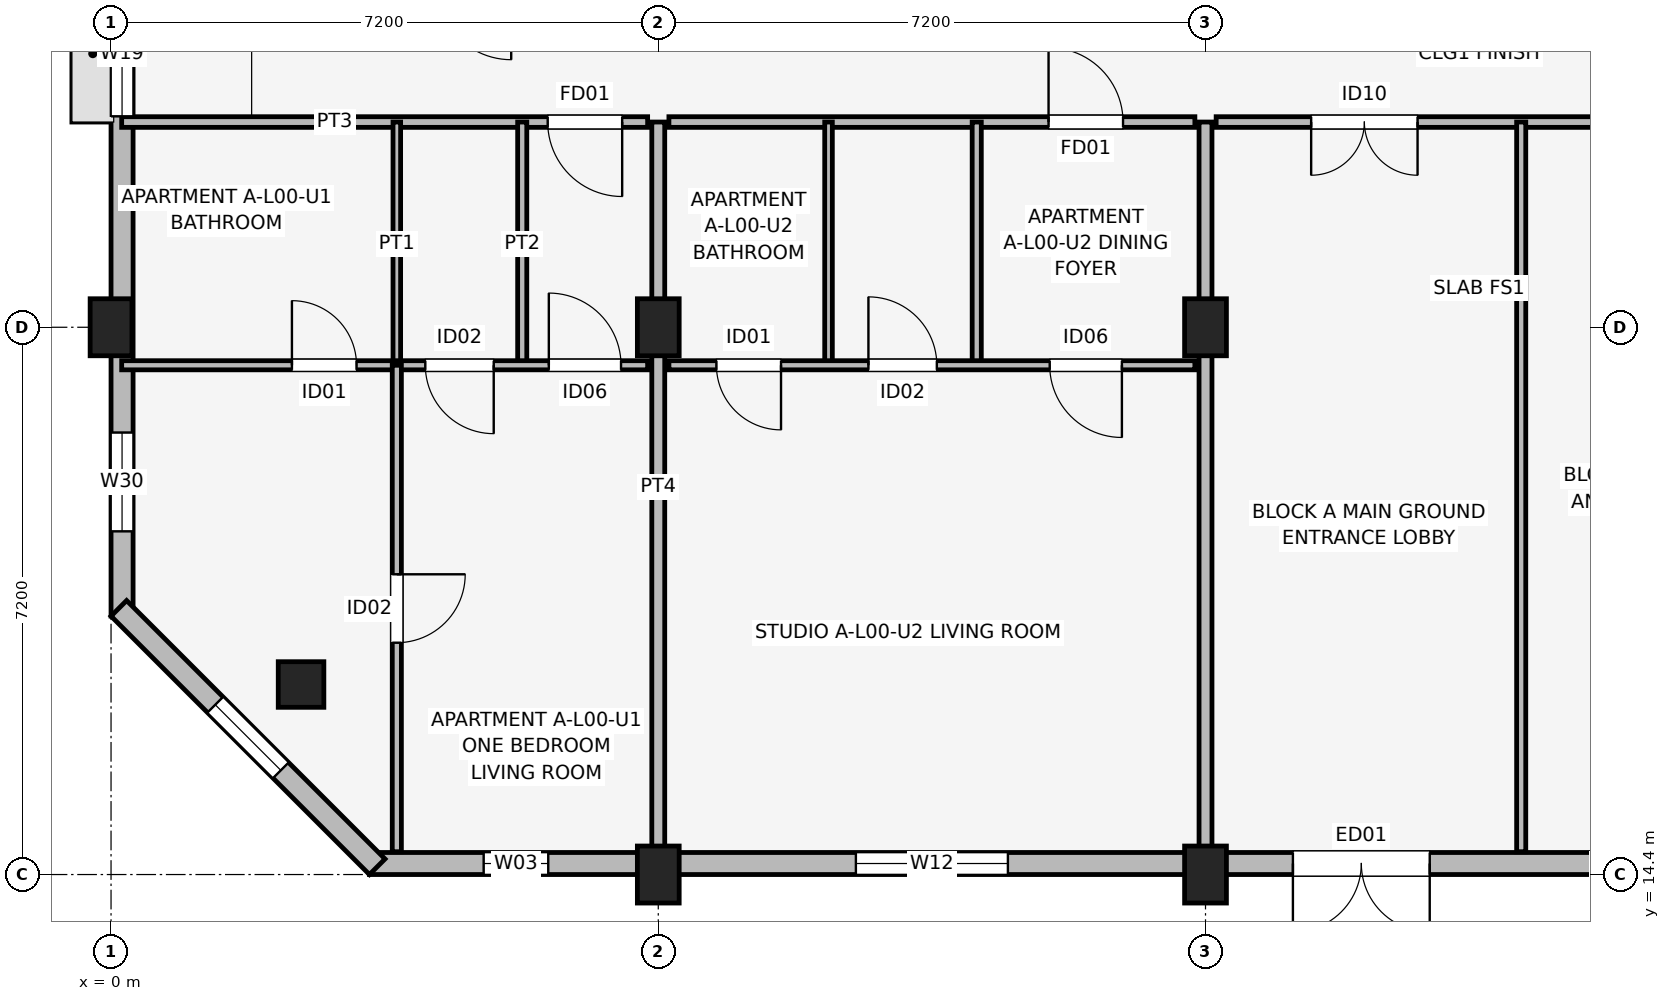
"""IFC4 building model, lengths in metres.
Left out: names, types, materials, properties, quantities, classifications, styles, units other than length and angle.
Written with IfcOpenShell. Run it as: python <this file> out.ifc"""

import sys

from ifc_helpers import new_model, si_unit, direction, frame, frame_2d, origin, origin_2d, place, context, subcontext, project, spatial, rectangle, extrude, element, fill, save


model = new_model("IFC4")
c1 = context("Model", 3, precision=1e-05, world=origin(), true_north=direction((0.0, 1.0)))
c2 = subcontext(c1, "Body", "Model", "MODEL_VIEW")
j1 = project(units=[si_unit("LENGTHUNIT", "METRE"), si_unit("PLANEANGLEUNIT", "RADIAN")], contexts=[c1])
p1 = place(None, origin())
s1 = spatial("IfcSite", under=j1, at=p1, CompositionType="ELEMENT")
p2 = place(p1, origin())
s2 = spatial("IfcBuilding", under=s1, at=p2, CompositionType="ELEMENT")
p3 = place(p2, origin())
s3 = spatial("IfcBuildingStorey", under=s2, at=p3, CompositionType="ELEMENT", Elevation=0.0)
p4 = place(p3, frame((2.5, 16.9, 0.0), z_axis=(0.0, 0.0, 1.0), x_axis=(1.0, 0.0, 0.0)))
e1 = element("IfcColumn", 1, at=p4, inside=s3, PredefinedType="COLUMN", context=c2, shape_type="SweptSolid", body=[
    extrude(rectangle(XDim=0.6, YDim=0.6, at=origin_2d()), origin(), (0.0, 0.0, 1.0), 4.5),
])
for number, where, z_axis, x_axis in (
    (2, (0.0, 21.6, 0.0), (0.0, 0.0, 1.0), (1.0, 0.0, 0.0)),
    (3, (7.2, 14.4, 0.0), (0.0, 0.0, 1.0), (1.0, 0.0, 0.0)),
    (4, (7.2, 21.6, 0.0), (0.0, 0.0, 1.0), (1.0, 0.0, 0.0)),
    (5, (14.4, 14.4, 0.0), (0.0, 0.0, 1.0), (1.0, 0.0, 0.0)),
    (6, (14.4, 21.6, 0.0), (0.0, 0.0, 1.0), (1.0, 0.0, 0.0)),
):
    element("IfcColumn", number, at=place(p3, frame(where, z_axis=z_axis, x_axis=x_axis)), inside=s3, PredefinedType="COLUMN", context=c2, shape_type="SweptSolid", body=[
        extrude(rectangle(XDim=0.55, YDim=0.75, at=origin_2d()), origin(), (0.0, 0.0, 1.0), 4.5),
    ])
p5 = place(p3, frame((3.4, 14.545, 0.0), z_axis=(0.0, 0.0, 1.0), x_axis=(1.0, 0.0, 0.0)))
e7 = element("IfcWall", 7, at=p5, inside=s3, PredefinedType="SOLIDWALL", context=c2, shape_type="SweptSolid", body=[
    extrude(rectangle(XDim=29.2, YDim=0.29, at=frame_2d((14.6, 0.0))), origin(), (0.0, 0.0, 1.0), 3.53),
])
p6 = place(p5, frame((13.95, 0.0, 0.0), z_axis=(0.0, 0.0, 1.0), x_axis=(-1.0, 0.0, 0.0)))
e8 = element("IfcOpeningElement", 8, at=p6, cuts=e7, PredefinedType="OPENING", context=c2, shape_type="SweptSolid", body=[
    extrude(rectangle(XDim=1.8, YDim=2.4, at=frame_2d((0.9, 1.2))), frame((0.0, 0.155, 0.0), z_axis=(0.0, -1.0, 0.0), x_axis=(1.0, 0.0, 0.0)), (0.0, 0.0, 1.0), 0.31),
])
p7 = place(p5, frame((1.502, 0.0, 0.75)))
e9 = element("IfcOpeningElement", 9, at=p7, cuts=e7, PredefinedType="OPENING", context=c2, shape_type="SweptSolid", body=[
    extrude(rectangle(XDim=0.85, YDim=1.4, at=frame_2d((0.425, 0.7))), frame((0.0, 0.155, 0.0), z_axis=(0.0, -1.0, 0.0), x_axis=(1.0, 0.0, 0.0)), (0.0, 0.0, 1.0), 0.31),
])
p8 = place(p5, frame((6.4, 0.0, 0.7)))
e10 = element("IfcOpeningElement", 10, at=p8, cuts=e7, PredefinedType="OPENING", context=c2, shape_type="SweptSolid", body=[
    extrude(rectangle(XDim=2.0, YDim=1.65, at=frame_2d((1.0, 0.825))), frame((0.0, 0.155, 0.0), z_axis=(0.0, -1.0, 0.0), x_axis=(1.0, 0.0, 0.0)), (0.0, 0.0, 1.0), 0.31),
])
p9 = place(p5, frame((18.798, 0.0, 0.75)))
e11 = element("IfcOpeningElement", 11, at=p9, cuts=e7, PredefinedType="OPENING", context=c2, shape_type="SweptSolid", body=[
    extrude(rectangle(XDim=1.1, YDim=1.5, at=frame_2d((0.55, 0.75))), frame((0.0, 0.155, 0.0), z_axis=(0.0, -1.0, 0.0), x_axis=(1.0, 0.0, 0.0)), (0.0, 0.0, 1.0), 0.31),
])
p10 = place(p5, frame((21.492, 0.0, 0.7)))
e12 = element("IfcOpeningElement", 12, at=p10, cuts=e7, PredefinedType="OPENING", context=c2, shape_type="SweptSolid", body=[
    extrude(rectangle(XDim=2.3, YDim=1.65, at=frame_2d((1.15, 0.825))), frame((0.0, 0.155, 0.0), z_axis=(0.0, -1.0, 0.0), x_axis=(1.0, 0.0, 0.0)), (0.0, 0.0, 1.0), 0.31),
])
p11 = place(p5, frame((25.877, 0.0, 0.75)))
e13 = element("IfcOpeningElement", 13, at=p11, cuts=e7, PredefinedType="OPENING", context=c2, shape_type="SweptSolid", body=[
    extrude(rectangle(XDim=1.34, YDim=1.55, at=frame_2d((0.67, 0.775))), frame((0.0, 0.155, 0.0), z_axis=(0.0, -1.0, 0.0), x_axis=(1.0, 0.0, 0.0)), (0.0, 0.0, 1.0), 0.31),
])
p12 = place(p3, frame((0.145, 32.6, 0.0), z_axis=(0.0, 0.0, 1.0), x_axis=(0.0, -1.0, 0.0)))
e14 = element("IfcWall", 14, at=p12, inside=s3, PredefinedType="SOLIDWALL", context=c2, shape_type="SweptSolid", body=[
    extrude(rectangle(XDim=14.8, YDim=0.29, at=frame_2d((7.4, 0.0))), origin(), (0.0, 0.0, 1.0), 3.53),
])
p13 = place(p12, frame((6.575, 0.0, 1.05)))
e15 = element("IfcOpeningElement", 15, at=p13, cuts=e14, PredefinedType="OPENING", context=c2, shape_type="SweptSolid", body=[
    extrude(rectangle(XDim=1.65, YDim=1.15, at=frame_2d((0.825, 0.575))), frame((0.0, 0.155, 0.0), z_axis=(0.0, -1.0, 0.0), x_axis=(1.0, 0.0, 0.0)), (0.0, 0.0, 1.0), 0.31),
])
p14 = place(p12, frame((12.385, 0.0, 0.75)))
e16 = element("IfcOpeningElement", 16, at=p14, cuts=e14, PredefinedType="OPENING", context=c2, shape_type="SweptSolid", body=[
    extrude(rectangle(XDim=1.3, YDim=1.55, at=frame_2d((0.65, 0.775))), frame((0.0, 0.155, 0.0), z_axis=(0.0, -1.0, 0.0), x_axis=(1.0, 0.0, 0.0)), (0.0, 0.0, 1.0), 0.31),
])
p15 = place(p3, frame((0.103, 17.903, 0.0), z_axis=(0.0, 0.0, 1.0), x_axis=(0.707081393635, -0.707132167827, 0.0)))
e17 = element("IfcWall", 17, at=p15, inside=s3, PredefinedType="SOLIDWALL", context=c2, shape_type="SweptSolid", body=[
    extrude(rectangle(XDim=4.808, YDim=0.29, at=frame_2d((2.404, 0.0))), origin(), (0.0, 0.0, 1.0), 4.175),
])
p16 = place(p15, frame((1.794, 0.0, 0.85)))
e18 = element("IfcOpeningElement", 18, at=p16, cuts=e17, PredefinedType="OPENING", context=c2, shape_type="SweptSolid", body=[
    extrude(rectangle(XDim=1.22, YDim=1.5, at=frame_2d((0.61, 0.75))), frame((0.0, 0.155, 0.0), z_axis=(0.0, -1.0, 0.0), x_axis=(1.0, 0.0, 0.0)), (0.0, 0.0, 1.0), 0.31),
])
p17 = place(p3, frame((0.14, 24.3, 0.0), z_axis=(0.0, 0.0, 1.0), x_axis=(1.0, 0.0, 0.0)))
e19 = element("IfcWall", 19, at=p17, inside=s3, PredefinedType="PARTITIONING", context=c2, shape_type="SweptSolid", body=[
    extrude(rectangle(XDim=6.92, YDim=0.14, at=frame_2d((3.46, 0.0))), origin(), (0.0, 0.0, 1.0), 3.15),
])
p18 = place(p17, frame((6.585, 0.0, 0.0), z_axis=(0.0, 0.0, 1.0), x_axis=(-1.0, 0.0, 0.0)))
e20 = element("IfcOpeningElement", 20, at=p18, cuts=e19, PredefinedType="OPENING", context=c2, shape_type="SweptSolid", body=[
    extrude(rectangle(XDim=0.98, YDim=2.1, at=frame_2d((0.49, 1.05))), frame((0.0, 0.08, 0.0), z_axis=(0.0, -1.0, 0.0), x_axis=(1.0, 0.0, 0.0)), (0.0, 0.0, 1.0), 0.16),
])
p19 = place(p3, frame((3.76, 21.1, 0.0), z_axis=(0.0, 0.0, 1.0), x_axis=(0.0, 1.0, 0.0)))
e21 = element("IfcWall", 21, at=p19, inside=s3, PredefinedType="PARTITIONING", context=c2, shape_type="SweptSolid", body=[
    extrude(rectangle(XDim=3.2, YDim=0.1, at=frame_2d((1.6, 0.0))), origin(), (0.0, 0.0, 1.0), 3.15),
])
p20 = place(p3, frame((5.41, 21.1, 0.0), z_axis=(0.0, 0.0, 1.0), x_axis=(0.0, 1.0, 0.0)))
e22 = element("IfcWall", 22, at=p20, inside=s3, PredefinedType="PARTITIONING", context=c2, shape_type="SweptSolid", body=[
    extrude(rectangle(XDim=3.2, YDim=0.12, at=frame_2d((1.6, 0.0))), origin(), (0.0, 0.0, 1.0), 3.15),
])
p21 = place(p3, frame((0.14, 21.1, 0.0), z_axis=(0.0, 0.0, 1.0), x_axis=(1.0, 0.0, 0.0)))
e23 = element("IfcWall", 23, at=p21, inside=s3, PredefinedType="PARTITIONING", context=c2, shape_type="SweptSolid", body=[
    extrude(rectangle(XDim=6.92, YDim=0.12, at=frame_2d((3.46, 0.0))), origin(), (0.0, 0.0, 1.0), 3.15),
])
p22 = place(p21, frame((2.24, 0.0, 0.0)))
e24 = element("IfcOpeningElement", 24, at=p22, cuts=e23, PredefinedType="OPENING", context=c2, shape_type="SweptSolid", body=[
    extrude(rectangle(XDim=0.85, YDim=2.08, at=frame_2d((0.425, 1.04))), frame((0.0, 0.07, 0.0), z_axis=(0.0, -1.0, 0.0), x_axis=(1.0, 0.0, 0.0)), (0.0, 0.0, 1.0), 0.14),
])
p23 = place(p21, frame((4.895, 0.0, 0.0), z_axis=(0.0, 0.0, 1.0), x_axis=(-1.0, 0.0, 0.0)))
e25 = element("IfcOpeningElement", 25, at=p23, cuts=e23, PredefinedType="OPENING", context=c2, shape_type="SweptSolid", body=[
    extrude(rectangle(XDim=0.9, YDim=2.08, at=frame_2d((0.45, 1.04))), frame((0.0, 0.07, 0.0), z_axis=(0.0, -1.0, 0.0), x_axis=(1.0, 0.0, 0.0)), (0.0, 0.0, 1.0), 0.14),
])
p24 = place(p21, frame((5.62, 0.0, 0.0)))
e26 = element("IfcOpeningElement", 26, at=p24, cuts=e23, PredefinedType="OPENING", context=c2, shape_type="SweptSolid", body=[
    extrude(rectangle(XDim=0.95, YDim=2.08, at=frame_2d((0.475, 1.04))), frame((0.0, 0.07, 0.0), z_axis=(0.0, -1.0, 0.0), x_axis=(1.0, 0.0, 0.0)), (0.0, 0.0, 1.0), 0.14),
])
p25 = place(p3, frame((3.76, 14.7, 0.0), z_axis=(0.0, 0.0, 1.0), x_axis=(0.0, 1.0, 0.0)))
e27 = element("IfcWall", 27, at=p25, inside=s3, PredefinedType="PARTITIONING", context=c2, shape_type="SweptSolid", body=[
    extrude(rectangle(XDim=6.4, YDim=0.12, at=frame_2d((3.2, 0.0))), origin(), (0.0, 0.0, 1.0), 3.15),
])
p26 = place(p25, frame((3.65, 0.0, 0.0), z_axis=(0.0, 0.0, 1.0), x_axis=(-1.0, 0.0, 0.0)))
e28 = element("IfcOpeningElement", 28, at=p26, cuts=e27, PredefinedType="OPENING", context=c2, shape_type="SweptSolid", body=[
    extrude(rectangle(XDim=0.9, YDim=2.08, at=frame_2d((0.45, 1.04))), frame((0.0, 0.07, 0.0), z_axis=(0.0, -1.0, 0.0), x_axis=(1.0, 0.0, 0.0)), (0.0, 0.0, 1.0), 0.14),
])
p27 = place(p3, frame((7.2, 14.7, 0.0), z_axis=(0.0, 0.0, 1.0), x_axis=(0.0, 1.0, 0.0)))
e29 = element("IfcWall", 29, at=p27, inside=s3, PredefinedType="PARTITIONING", context=c2, shape_type="SweptSolid", body=[
    extrude(rectangle(XDim=9.6, YDim=0.17, at=frame_2d((4.8, 0.0))), origin(), (0.0, 0.0, 1.0), 3.15),
])
p28 = place(p3, frame((7.34, 24.3, 0.0), z_axis=(0.0, 0.0, 1.0), x_axis=(1.0, 0.0, 0.0)))
e30 = element("IfcWall", 30, at=p28, inside=s3, PredefinedType="PARTITIONING", context=c2, shape_type="SweptSolid", body=[
    extrude(rectangle(XDim=6.92, YDim=0.14, at=frame_2d((3.46, 0.0))), origin(), (0.0, 0.0, 1.0), 3.15),
])
p29 = place(p28, frame((4.995, 0.0, 0.0)))
e31 = element("IfcOpeningElement", 31, at=p29, cuts=e30, PredefinedType="OPENING", context=c2, shape_type="SweptSolid", body=[
    extrude(rectangle(XDim=0.98, YDim=2.1, at=frame_2d((0.49, 1.05))), frame((0.0, 0.08, 0.0), z_axis=(0.0, -1.0, 0.0), x_axis=(1.0, 0.0, 0.0)), (0.0, 0.0, 1.0), 0.16),
])
p30 = place(p3, frame((9.44, 21.1, 0.0), z_axis=(0.0, 0.0, 1.0), x_axis=(0.0, 1.0, 0.0)))
e32 = element("IfcWall", 32, at=p30, inside=s3, PredefinedType="PARTITIONING", context=c2, shape_type="SweptSolid", body=[
    extrude(rectangle(XDim=3.2, YDim=0.1, at=frame_2d((1.6, 0.0))), origin(), (0.0, 0.0, 1.0), 3.15),
])
p31 = place(p3, frame((11.39, 21.1, 0.0), z_axis=(0.0, 0.0, 1.0), x_axis=(0.0, 1.0, 0.0)))
e33 = element("IfcWall", 33, at=p31, inside=s3, PredefinedType="PARTITIONING", context=c2, shape_type="SweptSolid", body=[
    extrude(rectangle(XDim=3.2, YDim=0.12, at=frame_2d((1.6, 0.0))), origin(), (0.0, 0.0, 1.0), 3.15),
])
p32 = place(p3, frame((7.34, 21.1, 0.0), z_axis=(0.0, 0.0, 1.0), x_axis=(1.0, 0.0, 0.0)))
e34 = element("IfcWall", 34, at=p32, inside=s3, PredefinedType="PARTITIONING", context=c2, shape_type="SweptSolid", body=[
    extrude(rectangle(XDim=6.92, YDim=0.12, at=frame_2d((3.46, 0.0))), origin(), (0.0, 0.0, 1.0), 3.15),
])
p33 = place(p32, frame((1.475, 0.0, 0.0), z_axis=(0.0, 0.0, 1.0), x_axis=(-1.0, 0.0, 0.0)))
e35 = element("IfcOpeningElement", 35, at=p33, cuts=e34, PredefinedType="OPENING", context=c2, shape_type="SweptSolid", body=[
    extrude(rectangle(XDim=0.85, YDim=2.08, at=frame_2d((0.425, 1.04))), frame((0.0, 0.07, 0.0), z_axis=(0.0, -1.0, 0.0), x_axis=(1.0, 0.0, 0.0)), (0.0, 0.0, 1.0), 0.14),
])
p34 = place(p32, frame((2.625, 0.0, 0.0)))
e36 = element("IfcOpeningElement", 36, at=p34, cuts=e34, PredefinedType="OPENING", context=c2, shape_type="SweptSolid", body=[
    extrude(rectangle(XDim=0.9, YDim=2.08, at=frame_2d((0.45, 1.04))), frame((0.0, 0.07, 0.0), z_axis=(0.0, -1.0, 0.0), x_axis=(1.0, 0.0, 0.0)), (0.0, 0.0, 1.0), 0.14),
])
p35 = place(p32, frame((5.96, 0.0, 0.0), z_axis=(0.0, 0.0, 1.0), x_axis=(-1.0, 0.0, 0.0)))
e37 = element("IfcOpeningElement", 37, at=p35, cuts=e34, PredefinedType="OPENING", context=c2, shape_type="SweptSolid", body=[
    extrude(rectangle(XDim=0.95, YDim=2.08, at=frame_2d((0.475, 1.04))), frame((0.0, 0.07, 0.0), z_axis=(0.0, -1.0, 0.0), x_axis=(1.0, 0.0, 0.0)), (0.0, 0.0, 1.0), 0.14),
])
p36 = place(p3, frame((14.4, 14.7, 0.0), z_axis=(0.0, 0.0, 1.0), x_axis=(0.0, 1.0, 0.0)))
e38 = element("IfcWall", 38, at=p36, inside=s3, PredefinedType="PARTITIONING", context=c2, shape_type="SweptSolid", body=[
    extrude(rectangle(XDim=9.6, YDim=0.17, at=frame_2d((4.8, 0.0))), origin(), (0.0, 0.0, 1.0), 3.15),
])
p37 = place(p3, frame((14.54, 24.3, 0.0), z_axis=(0.0, 0.0, 1.0), x_axis=(1.0, 0.0, 0.0)))
e39 = element("IfcWall", 39, at=p37, inside=s3, PredefinedType="PARTITIONING", context=c2, shape_type="SweptSolid", body=[
    extrude(rectangle(XDim=6.92, YDim=0.14, at=frame_2d((3.46, 0.0))), origin(), (0.0, 0.0, 1.0), 3.15),
])
p38 = place(p37, frame((2.65, 0.0, 0.0), z_axis=(0.0, 0.0, 1.0), x_axis=(-1.0, 0.0, 0.0)))
e40 = element("IfcOpeningElement", 40, at=p38, cuts=e39, PredefinedType="OPENING", context=c2, shape_type="SweptSolid", body=[
    extrude(rectangle(XDim=1.4, YDim=2.22, at=frame_2d((0.7, 1.11))), frame((0.0, 0.08, 0.0), z_axis=(0.0, -1.0, 0.0), x_axis=(1.0, 0.0, 0.0)), (0.0, 0.0, 1.0), 0.16),
])
p39 = place(p37, frame((5.07, 0.0, 0.0)))
e41 = element("IfcOpeningElement", 41, at=p39, cuts=e39, PredefinedType="OPENING", context=c2, shape_type="SweptSolid", body=[
    extrude(rectangle(XDim=1.0, YDim=2.12, at=frame_2d((0.5, 1.06))), frame((0.0, 0.08, 0.0), z_axis=(0.0, -1.0, 0.0), x_axis=(1.0, 0.0, 0.0)), (0.0, 0.0, 1.0), 0.16),
])
p40 = place(p3, frame((18.554, 14.7, 0.0), z_axis=(0.0, 0.0, 1.0), x_axis=(0.0, 1.0, 0.0)))
e42 = element("IfcWall", 42, at=p40, inside=s3, PredefinedType="PARTITIONING", context=c2, shape_type="SweptSolid", body=[
    extrude(rectangle(XDim=9.6, YDim=0.12, at=frame_2d((4.8, 0.0))), origin(), (0.0, 0.0, 1.0), 3.15),
])
p41 = place(p16, origin())
e43 = element("IfcWindow", 43, at=p41, inside=s3, PartitioningType="SINGLE_PANEL", PredefinedType="WINDOW", context=c2, shape_type="SweptSolid", body=[
    extrude(rectangle(XDim=1.22, YDim=1.5, at=frame_2d((0.61, 0.75))), frame((0.0, 0.03, 0.0), z_axis=(0.0, -1.0, 0.0), x_axis=(1.0, 0.0, 0.0)), (0.0, 0.0, 1.0), 0.06),
])
fill(e18, e43)
p42 = place(p6, origin())
e44 = element("IfcDoor", 44, at=p42, inside=s3, OperationType="DOUBLE_DOOR_SINGLE_SWING", PredefinedType="DOOR", context=c2, shape_type="SweptSolid", body=[
    extrude(rectangle(XDim=1.8, YDim=2.4, at=frame_2d((0.9, 1.2))), frame((0.0, 0.025, 0.0), z_axis=(0.0, -1.0, 0.0), x_axis=(1.0, 0.0, 0.0)), (0.0, 0.0, 1.0), 0.05),
])
fill(e8, e44)
p43 = place(p7, origin())
e45 = element("IfcWindow", 45, at=p43, inside=s3, PartitioningType="SINGLE_PANEL", PredefinedType="WINDOW", context=c2, shape_type="SweptSolid", body=[
    extrude(rectangle(XDim=0.85, YDim=1.4, at=frame_2d((0.425, 0.7))), frame((0.0, 0.03, 0.0), z_axis=(0.0, -1.0, 0.0), x_axis=(1.0, 0.0, 0.0)), (0.0, 0.0, 1.0), 0.06),
])
fill(e9, e45)
p44 = place(p8, origin())
e46 = element("IfcWindow", 46, at=p44, inside=s3, PartitioningType="SINGLE_PANEL", PredefinedType="WINDOW", context=c2, shape_type="SweptSolid", body=[
    extrude(rectangle(XDim=2.0, YDim=1.65, at=frame_2d((1.0, 0.825))), frame((0.0, 0.03, 0.0), z_axis=(0.0, -1.0, 0.0), x_axis=(1.0, 0.0, 0.0)), (0.0, 0.0, 1.0), 0.06),
])
fill(e10, e46)
p45 = place(p13, origin())
e47 = element("IfcWindow", 47, at=p45, inside=s3, PartitioningType="SINGLE_PANEL", PredefinedType="WINDOW", context=c2, shape_type="SweptSolid", body=[
    extrude(rectangle(XDim=1.65, YDim=1.15, at=frame_2d((0.825, 0.575))), frame((0.0, 0.03, 0.0), z_axis=(0.0, -1.0, 0.0), x_axis=(1.0, 0.0, 0.0)), (0.0, 0.0, 1.0), 0.06),
])
fill(e15, e47)
p46 = place(p14, origin())
e48 = element("IfcWindow", 48, at=p46, inside=s3, PartitioningType="SINGLE_PANEL", PredefinedType="WINDOW", context=c2, shape_type="SweptSolid", body=[
    extrude(rectangle(XDim=1.3, YDim=1.55, at=frame_2d((0.65, 0.775))), frame((0.0, 0.03, 0.0), z_axis=(0.0, -1.0, 0.0), x_axis=(1.0, 0.0, 0.0)), (0.0, 0.0, 1.0), 0.06),
])
fill(e16, e48)
p47 = place(p18, origin())
e49 = element("IfcDoor", 49, at=p47, inside=s3, OperationType="SINGLE_SWING_RIGHT", PredefinedType="DOOR", context=c2, shape_type="SweptSolid", body=[
    extrude(rectangle(XDim=0.98, YDim=2.1, at=frame_2d((0.49, 1.05))), frame((0.0, 0.025, 0.0), z_axis=(0.0, -1.0, 0.0), x_axis=(1.0, 0.0, 0.0)), (0.0, 0.0, 1.0), 0.05),
])
fill(e20, e49)
p48 = place(p22, origin())
e50 = element("IfcDoor", 50, at=p48, inside=s3, OperationType="SINGLE_SWING_LEFT", PredefinedType="DOOR", context=c2, shape_type="SweptSolid", body=[
    extrude(rectangle(XDim=0.85, YDim=2.08, at=frame_2d((0.425, 1.04))), frame((0.0, 0.025, 0.0), z_axis=(0.0, -1.0, 0.0), x_axis=(1.0, 0.0, 0.0)), (0.0, 0.0, 1.0), 0.05),
])
fill(e24, e50)
p49 = place(p23, origin())
e51 = element("IfcDoor", 51, at=p49, inside=s3, OperationType="SINGLE_SWING_RIGHT", PredefinedType="DOOR", context=c2, shape_type="SweptSolid", body=[
    extrude(rectangle(XDim=0.9, YDim=2.08, at=frame_2d((0.45, 1.04))), frame((0.0, 0.025, 0.0), z_axis=(0.0, -1.0, 0.0), x_axis=(1.0, 0.0, 0.0)), (0.0, 0.0, 1.0), 0.05),
])
fill(e25, e51)
p50 = place(p24, origin())
e52 = element("IfcDoor", 52, at=p50, inside=s3, OperationType="SINGLE_SWING_LEFT", PredefinedType="DOOR", context=c2, shape_type="SweptSolid", body=[
    extrude(rectangle(XDim=0.95, YDim=2.08, at=frame_2d((0.475, 1.04))), frame((0.0, 0.025, 0.0), z_axis=(0.0, -1.0, 0.0), x_axis=(1.0, 0.0, 0.0)), (0.0, 0.0, 1.0), 0.05),
])
fill(e26, e52)
p51 = place(p26, origin())
e53 = element("IfcDoor", 53, at=p51, inside=s3, OperationType="SINGLE_SWING_RIGHT", PredefinedType="DOOR", context=c2, shape_type="SweptSolid", body=[
    extrude(rectangle(XDim=0.9, YDim=2.08, at=frame_2d((0.45, 1.04))), frame((0.0, 0.025, 0.0), z_axis=(0.0, -1.0, 0.0), x_axis=(1.0, 0.0, 0.0)), (0.0, 0.0, 1.0), 0.05),
])
fill(e28, e53)
p52 = place(p29, origin())
e54 = element("IfcDoor", 54, at=p52, inside=s3, OperationType="SINGLE_SWING_LEFT", PredefinedType="DOOR", context=c2, shape_type="SweptSolid", body=[
    extrude(rectangle(XDim=0.98, YDim=2.1, at=frame_2d((0.49, 1.05))), frame((0.0, 0.025, 0.0), z_axis=(0.0, -1.0, 0.0), x_axis=(1.0, 0.0, 0.0)), (0.0, 0.0, 1.0), 0.05),
])
fill(e31, e54)
p53 = place(p33, origin())
e55 = element("IfcDoor", 55, at=p53, inside=s3, OperationType="SINGLE_SWING_RIGHT", PredefinedType="DOOR", context=c2, shape_type="SweptSolid", body=[
    extrude(rectangle(XDim=0.85, YDim=2.08, at=frame_2d((0.425, 1.04))), frame((0.0, 0.025, 0.0), z_axis=(0.0, -1.0, 0.0), x_axis=(1.0, 0.0, 0.0)), (0.0, 0.0, 1.0), 0.05),
])
fill(e35, e55)
p54 = place(p34, origin())
e56 = element("IfcDoor", 56, at=p54, inside=s3, OperationType="SINGLE_SWING_LEFT", PredefinedType="DOOR", context=c2, shape_type="SweptSolid", body=[
    extrude(rectangle(XDim=0.9, YDim=2.08, at=frame_2d((0.45, 1.04))), frame((0.0, 0.025, 0.0), z_axis=(0.0, -1.0, 0.0), x_axis=(1.0, 0.0, 0.0)), (0.0, 0.0, 1.0), 0.05),
])
fill(e36, e56)
p55 = place(p35, origin())
e57 = element("IfcDoor", 57, at=p55, inside=s3, OperationType="SINGLE_SWING_RIGHT", PredefinedType="DOOR", context=c2, shape_type="SweptSolid", body=[
    extrude(rectangle(XDim=0.95, YDim=2.08, at=frame_2d((0.475, 1.04))), frame((0.0, 0.025, 0.0), z_axis=(0.0, -1.0, 0.0), x_axis=(1.0, 0.0, 0.0)), (0.0, 0.0, 1.0), 0.05),
])
fill(e37, e57)
p56 = place(p38, origin())
e58 = element("IfcDoor", 58, at=p56, inside=s3, OperationType="DOUBLE_DOOR_SINGLE_SWING", PredefinedType="DOOR", context=c2, shape_type="SweptSolid", body=[
    extrude(rectangle(XDim=1.4, YDim=2.22, at=frame_2d((0.7, 1.11))), frame((0.0, 0.025, 0.0), z_axis=(0.0, -1.0, 0.0), x_axis=(1.0, 0.0, 0.0)), (0.0, 0.0, 1.0), 0.05),
])
fill(e40, e58)
save(model, sys.argv[1])
